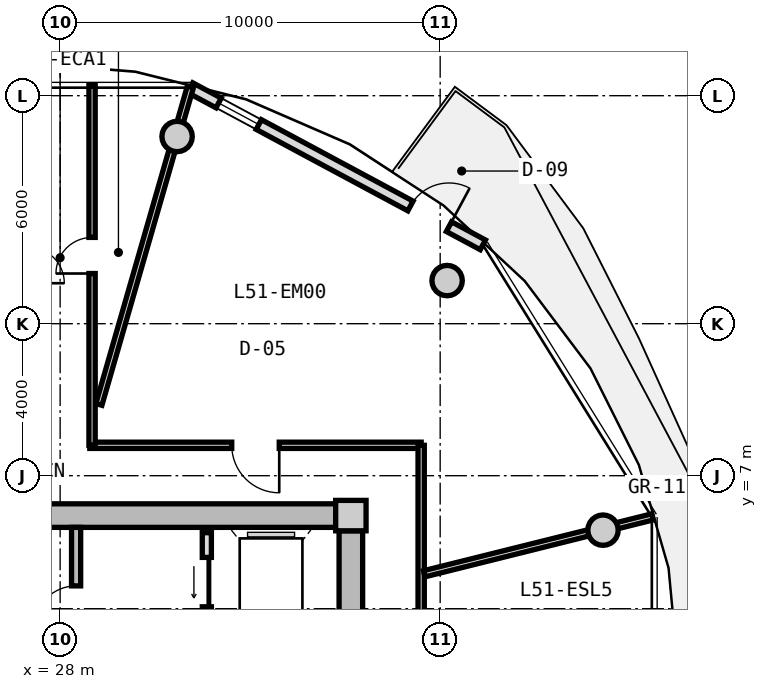
"""IFC4 building model, lengths in metres.
Left out: names, types, materials, properties, quantities, classifications, styles, units other than length and angle.
Written with IfcOpenShell. Run it as: python <this file> out.ifc"""

import sys

from ifc_helpers import new_model, si_unit, direction, frame, frame_2d, origin, origin_2d, place, context, subcontext, project, spatial, rectangle, circle, extrude, source, transform, mapped, element, fill, save


model = new_model("IFC4")
c1 = context("Model", 3, precision=1e-05, world=origin(), true_north=direction((0.0, 1.0)))
c2 = subcontext(c1, "Body", "Model", "MODEL_VIEW")
j1 = project(units=[si_unit("LENGTHUNIT", "METRE"), si_unit("PLANEANGLEUNIT", "RADIAN")], contexts=[c1])
p1 = place(None, origin())
s1 = spatial("IfcSite", under=j1, at=p1, CompositionType="ELEMENT")
p2 = place(p1, origin())
s2 = spatial("IfcBuilding", under=s1, at=p2, CompositionType="ELEMENT")
p3 = place(p2, frame((0.0, 0.0, 164.8)))
s3 = spatial("IfcBuildingStorey", under=s2, at=p3, CompositionType="ELEMENT", Elevation=164.8)
m1 = source(origin(), c2, "Body", "SweptSolid", [
    extrude(rectangle(XDim=0.8, YDim=0.8, at=origin_2d()), origin(), (0.0, 0.0, 1.0), 3.05),
])
p4 = place(p3, frame((35.65, 5.95, 0.0), z_axis=(0.0, 0.0, 1.0), x_axis=(1.0, 0.0, 0.0)))
e1 = element("IfcColumn", 1, at=p4, inside=s3, PredefinedType="COLUMN", context=c2, shape_type="MappedRepresentation", body=[
    mapped(m1, transform((0.0, 0.0, 0.0), x_axis=(1.0, 0.0, 0.0), y_axis=(0.0, 1.0, 0.0), z_axis=(0.0, 0.0, 1.0), scale=1.0)),
])
m2 = source(origin(), c2, "Body", "SweptSolid", [
    extrude(rectangle(XDim=14.5, YDim=0.62, at=frame_2d((7.25, 0.0))), origin(), (0.0, 0.0, 1.0), 2.81),
])
p5 = place(p3, frame((20.75, 5.95, 0.0), z_axis=(0.0, 0.0, 1.0), x_axis=(1.0, 0.0, 0.0)))
e2 = element("IfcWall", 2, at=p5, inside=s3, PredefinedType="SHEAR", context=c2, shape_type="MappedRepresentation", body=[
    mapped(m2, transform((0.0, 0.0, 0.0), x_axis=(1.0, 0.0, 0.0), y_axis=(0.0, 1.0, 0.0), z_axis=(0.0, 0.0, 1.0), scale=1.0)),
])
m3 = source(origin(), c2, "Body", "SweptSolid", [
    extrude(rectangle(XDim=11.1, YDim=0.62, at=frame_2d((5.55, 0.0))), origin(), (0.0, 0.0, 1.0), 2.81),
])
p6 = place(p3, frame((35.65, 5.55, 0.0), z_axis=(0.0, 0.0, 1.0), x_axis=(0.0, -1.0, 0.0)))
e3 = element("IfcWall", 3, at=p6, inside=s3, PredefinedType="SHEAR", context=c2, shape_type="MappedRepresentation", body=[
    mapped(m3, transform((0.0, 0.0, 0.0), x_axis=(1.0, 0.0, 0.0), y_axis=(0.0, 1.0, 0.0), z_axis=(0.0, 0.0, 1.0), scale=1.0)),
])
p7 = place(p6, frame((5.65, 0.0, 0.0)))
e4 = element("IfcOpeningElement", 4, at=p7, cuts=e3, PredefinedType="OPENING", context=c2, shape_type="SweptSolid", body=[
    extrude(rectangle(XDim=1.2, YDim=2.15, at=frame_2d((0.6, 1.075))), frame((0.0, 0.32, 0.0), z_axis=(0.0, -1.0, 0.0), x_axis=(1.0, 0.0, 0.0)), (0.0, 0.0, 1.0), 0.64),
])
m4 = source(origin(), c2, "Body", "SweptSolid", [
    extrude(circle(Radius=0.4, at=origin_2d()), origin(), (0.0, 0.0, 1.0), 3.05),
])
for number, where, z_axis, x_axis in (
    (5, (42.285, 5.567, 0.0), (0.0, 0.0, 1.0), (1.0, 0.0, 0.0)),
    (6, (38.183, 12.135, 0.0), (0.0, 0.0, 1.0), (1.0, 0.0, 0.0)),
    (7, (31.077, 15.926, 0.0), (0.0, 0.0, 1.0), (1.0, 0.0, 0.0)),
):
    element("IfcColumn", number, at=place(p3, frame(where, z_axis=z_axis, x_axis=x_axis)), inside=s3, PredefinedType="COLUMN", context=c2, shape_type="MappedRepresentation", body=[
        mapped(m4, transform((0.0, 0.0, 0.0), x_axis=(1.0, 0.0, 0.0), y_axis=(0.0, 1.0, 0.0), z_axis=(0.0, 0.0, 1.0), scale=1.0)),
    ])
m5 = source(origin(), c2, "Body", "SweptSolid", [
    extrude(rectangle(XDim=8.742, YDim=0.29, at=frame_2d((4.371, 0.0))), origin(), (0.0, 0.0, 1.0), 2.81),
])
p8 = place(p3, frame((31.422, 17.211, 0.0), z_axis=(0.0, 0.0, 1.0), x_axis=(0.880992489116, -0.473130250693, 0.0)))
e8 = element("IfcWall", 8, at=p8, inside=s3, PredefinedType="SOLIDWALL", context=c2, shape_type="MappedRepresentation", body=[
    mapped(m5, transform((0.0, 0.0, 0.0), x_axis=(1.0, 0.0, 0.0), y_axis=(0.0, 1.0, 0.0), z_axis=(0.0, 0.0, 1.0), scale=1.0)),
])
p9 = place(p8, frame((6.58, 0.0, 0.0)))
e9 = element("IfcOpeningElement", 9, at=p9, cuts=e8, PredefinedType="OPENING", context=c2, shape_type="SweptSolid", body=[
    extrude(rectangle(XDim=1.15, YDim=2.25, at=frame_2d((0.575, 1.125))), frame((0.0, 0.155, 0.0), z_axis=(0.0, -1.0, 0.0), x_axis=(1.0, 0.0, 0.0)), (0.0, 0.0, 1.0), 0.31),
])
p10 = place(p8, frame((0.85, 0.0, 0.85)))
e10 = element("IfcOpeningElement", 10, at=p10, cuts=e8, PredefinedType="OPENING", context=c2, shape_type="SweptSolid", body=[
    extrude(rectangle(XDim=1.2, YDim=1.5, at=frame_2d((0.6, 0.75))), frame((0.0, 0.155, 0.0), z_axis=(0.0, -1.0, 0.0), x_axis=(1.0, 0.0, 0.0)), (0.0, 0.0, 1.0), 0.31),
])
m6 = source(origin(), c2, "Body", "SweptSolid", [
    extrude(rectangle(XDim=3.19, YDim=0.24, at=frame_2d((1.595, 0.0))), origin(), (0.0, 0.0, 1.0), 2.81),
])
p11 = place(p3, frame((28.42, 2.45, 0.0), z_axis=(0.0, 0.0, 1.0), x_axis=(0.0, 1.0, 0.0)))
e11 = element("IfcWall", 11, at=p11, inside=s3, PredefinedType="PARTITIONING", context=c2, shape_type="MappedRepresentation", body=[
    mapped(m6, transform((0.0, 0.0, 0.0), x_axis=(1.0, 0.0, 0.0), y_axis=(0.0, 1.0, 0.0), z_axis=(0.0, 0.0, 1.0), scale=1.0)),
])
p12 = place(p11, frame((0.55, 0.0, 0.0)))
e12 = element("IfcOpeningElement", 12, at=p12, cuts=e11, PredefinedType="OPENING", context=c2, shape_type="SweptSolid", body=[
    extrude(rectangle(XDim=1.1, YDim=2.15, at=frame_2d((0.55, 1.075))), frame((0.0, 0.13, 0.0), z_axis=(0.0, -1.0, 0.0), x_axis=(1.0, 0.0, 0.0)), (0.0, 0.0, 1.0), 0.26),
])
m7 = source(origin(), c2, "Body", "SweptSolid", [
    extrude(rectangle(XDim=5.0, YDim=0.24, at=frame_2d((2.5, 0.0))), origin(), (0.0, 0.0, 1.0), 2.795),
])
p13 = place(p3, frame((31.86, 0.5, 0.0), z_axis=(0.0, 0.0, 1.0), x_axis=(0.0, 1.0, 0.0)))
e13 = element("IfcWall", 13, at=p13, inside=s3, PredefinedType="PARTITIONING", context=c2, shape_type="MappedRepresentation", body=[
    mapped(m7, transform((0.0, 0.0, 0.0), x_axis=(1.0, 0.0, 0.0), y_axis=(0.0, 1.0, 0.0), z_axis=(0.0, 0.0, 1.0), scale=1.0)),
])
p14 = place(p13, frame((3.05, 0.0, 0.0)))
e14 = element("IfcOpeningElement", 14, at=p14, cuts=e13, PredefinedType="OPENING", context=c2, shape_type="SweptSolid", body=[
    extrude(rectangle(XDim=1.3, YDim=2.2, at=frame_2d((0.65, 1.1))), frame((0.0, 0.13, 0.0), z_axis=(0.0, -1.0, 0.0), x_axis=(1.0, 0.0, 0.0)), (0.0, 0.0, 1.0), 0.26),
])
p15 = place(p13, frame((0.55, 0.0, 0.0)))
e15 = element("IfcOpeningElement", 15, at=p15, cuts=e13, PredefinedType="OPENING", context=c2, shape_type="SweptSolid", body=[
    extrude(rectangle(XDim=1.3, YDim=2.2, at=frame_2d((0.65, 1.1))), frame((0.0, 0.13, 0.0), z_axis=(0.0, -1.0, 0.0), x_axis=(1.0, 0.0, 0.0)), (0.0, 0.0, 1.0), 0.26),
])
m8 = source(origin(), c2, "Body", "SweptSolid", [
    extrude(rectangle(XDim=8.719, YDim=0.165, at=frame_2d((4.36, 0.0))), origin(), (0.0, 0.0, 1.0), 2.795),
])
p16 = place(p3, frame((28.781, 7.8, 0.0), z_axis=(0.0, 0.0, 1.0), x_axis=(1.0, 0.0, 0.0)))
e16 = element("IfcWall", 16, at=p16, inside=s3, PredefinedType="PARTITIONING", context=c2, shape_type="MappedRepresentation", body=[
    mapped(m8, transform((0.0, 0.0, 0.0), x_axis=(1.0, 0.0, 0.0), y_axis=(0.0, 1.0, 0.0), z_axis=(0.0, 0.0, 1.0), scale=1.0)),
])
p17 = place(p16, frame((3.735, 0.0, 0.0)))
e17 = element("IfcOpeningElement", 17, at=p17, cuts=e16, PredefinedType="OPENING", context=c2, shape_type="SweptSolid", body=[
    extrude(rectangle(XDim=1.25, YDim=2.2, at=frame_2d((0.625, 1.1))), frame((0.0, 0.093, 0.0), z_axis=(0.0, -1.0, 0.0), x_axis=(1.0, 0.0, 0.0)), (0.0, 0.0, 1.0), 0.185),
])
m9 = source(origin(), c2, "Body", "SweptSolid", [
    extrude(rectangle(XDim=6.88, YDim=0.165, at=frame_2d((3.44, 0.0))), origin(), (0.0, 0.0, 1.0), 2.795),
])
p18 = place(p3, frame((37.5, 7.8, 0.0), z_axis=(0.0, 0.0, 1.0), x_axis=(0.0, -1.0, 0.0)))
e18 = element("IfcWall", 18, at=p18, inside=s3, PredefinedType="PARTITIONING", context=c2, shape_type="MappedRepresentation", body=[
    mapped(m9, transform((0.0, 0.0, 0.0), x_axis=(1.0, 0.0, 0.0), y_axis=(0.0, 1.0, 0.0), z_axis=(0.0, 0.0, 1.0), scale=1.0)),
])
m10 = source(origin(), c2, "Body", "SweptSolid", [
    extrude(rectangle(XDim=8.695, YDim=0.165, at=frame_2d((4.348, 0.0))), origin(), (0.0, 0.0, 1.0), 2.345),
])
p19 = place(p3, frame((29.02, 8.875, 0.0), z_axis=(0.0, 0.0, 1.0), x_axis=(0.276797231892, 0.960928349263, 0.0)))
e19 = element("IfcWall", 19, at=p19, inside=s3, PredefinedType="PARTITIONING", context=c2, shape_type="MappedRepresentation", body=[
    mapped(m10, transform((0.0, 0.0, 0.0), x_axis=(1.0, 0.0, 0.0), y_axis=(0.0, 1.0, 0.0), z_axis=(0.0, 0.0, 1.0), scale=1.0)),
])
m11 = source(origin(), c2, "Body", "SweptSolid", [
    extrude(rectangle(XDim=6.193, YDim=0.165, at=frame_2d((3.096, 0.0))), origin(), (0.0, 0.0, 1.0), 2.345),
])
p20 = place(p3, frame((37.58, 4.419, 0.0), z_axis=(0.0, 0.0, 1.0), x_axis=(0.970309243466, 0.241867674657, 0.0)))
e20 = element("IfcWall", 20, at=p20, inside=s3, PredefinedType="PARTITIONING", context=c2, shape_type="MappedRepresentation", body=[
    mapped(m11, transform((0.0, 0.0, 0.0), x_axis=(1.0, 0.0, 0.0), y_axis=(0.0, 1.0, 0.0), z_axis=(0.0, 0.0, 1.0), scale=1.0)),
])
m12 = source(origin(), c2, "Body", "SweptSolid", [
    extrude(rectangle(XDim=9.48, YDim=0.165, at=frame_2d((4.74, 0.0))), origin(), (0.0, 0.0, 1.0), 2.795),
])
p21 = place(p3, frame((28.84, 17.28, 0.0), z_axis=(0.0, 0.0, 1.0), x_axis=(0.0, -1.0, 0.0)))
e21 = element("IfcWall", 21, at=p21, inside=s3, PredefinedType="PARTITIONING", context=c2, shape_type="MappedRepresentation", body=[
    mapped(m12, transform((0.0, 0.0, 0.0), x_axis=(1.0, 0.0, 0.0), y_axis=(0.0, 1.0, 0.0), z_axis=(0.0, 0.0, 1.0), scale=1.0)),
])
p22 = place(p21, frame((4.01, 0.0, 0.0)))
e22 = element("IfcOpeningElement", 22, at=p22, cuts=e21, PredefinedType="OPENING", context=c2, shape_type="SweptSolid", body=[
    extrude(rectangle(XDim=0.95, YDim=2.1, at=frame_2d((0.475, 1.05))), frame((0.0, 0.093, 0.0), z_axis=(0.0, -1.0, 0.0), x_axis=(1.0, 0.0, 0.0)), (0.0, 0.0, 1.0), 0.185),
])
m13 = source(origin(), c2, "Body", "SweptSolid", [
    extrude(rectangle(XDim=1.15, YDim=2.25, at=frame_2d((0.575, 1.125))), frame((0.0, 0.025, 0.0), z_axis=(0.0, -1.0, 0.0), x_axis=(1.0, 0.0, 0.0)), (0.0, 0.0, 1.0), 0.05),
])
p23 = place(p9, origin())
e23 = element("IfcDoor", 23, at=p23, inside=s3, OperationType="SINGLE_SWING_RIGHT", PredefinedType="DOOR", context=c2, shape_type="MappedRepresentation", body=[
    mapped(m13, transform((0.0, 0.0, 0.0), x_axis=(1.0, 0.0, 0.0), y_axis=(0.0, 1.0, 0.0), z_axis=(0.0, 0.0, 1.0), scale=1.0)),
])
fill(e9, e23)
m14 = source(origin(), c2, "Body", "SweptSolid", [
    extrude(rectangle(XDim=1.2, YDim=1.5, at=frame_2d((0.6, 0.75))), frame((0.0, 0.03, 0.0), z_axis=(0.0, -1.0, 0.0), x_axis=(1.0, 0.0, 0.0)), (0.0, 0.0, 1.0), 0.06),
])
p24 = place(p10, origin())
e24 = element("IfcWindow", 24, at=p24, inside=s3, PartitioningType="SINGLE_PANEL", PredefinedType="WINDOW", context=c2, shape_type="MappedRepresentation", body=[
    mapped(m14, transform((0.0, 0.0, 0.0), x_axis=(1.0, 0.0, 0.0), y_axis=(0.0, 1.0, 0.0), z_axis=(0.0, 0.0, 1.0), scale=1.0)),
])
fill(e10, e24)
m15 = source(origin(), c2, "Body", "SweptSolid", [
    extrude(rectangle(XDim=1.1, YDim=2.15, at=frame_2d((0.55, 1.075))), frame((0.0, 0.025, 0.0), z_axis=(0.0, -1.0, 0.0), x_axis=(1.0, 0.0, 0.0)), (0.0, 0.0, 1.0), 0.05),
])
p25 = place(p12, origin())
e25 = element("IfcDoor", 25, at=p25, inside=s3, OperationType="SINGLE_SWING_LEFT", PredefinedType="DOOR", context=c2, shape_type="MappedRepresentation", body=[
    mapped(m15, transform((0.0, 0.0, 0.0), x_axis=(1.0, 0.0, 0.0), y_axis=(0.0, 1.0, 0.0), z_axis=(0.0, 0.0, 1.0), scale=1.0)),
])
fill(e12, e25)
m16 = source(origin(), c2, "Body", "SweptSolid", [
    extrude(rectangle(XDim=1.3, YDim=2.2, at=frame_2d((0.65, 1.1))), frame((0.0, 0.025, 0.0), z_axis=(0.0, -1.0, 0.0), x_axis=(1.0, 0.0, 0.0)), (0.0, 0.0, 1.0), 0.05),
])
p26 = place(p14, origin())
e26 = element("IfcDoor", 26, at=p26, inside=s3, OperationType="SLIDING_TO_LEFT", PredefinedType="DOOR", context=c2, shape_type="MappedRepresentation", body=[
    mapped(m16, transform((0.0, 0.0, 0.0), x_axis=(1.0, 0.0, 0.0), y_axis=(0.0, 1.0, 0.0), z_axis=(0.0, 0.0, 1.0), scale=1.0)),
])
fill(e14, e26)
m17 = source(origin(), c2, "Body", "SweptSolid", [
    extrude(rectangle(XDim=0.95, YDim=2.1, at=frame_2d((0.475, 1.05))), frame((0.0, 0.025, 0.0), z_axis=(0.0, -1.0, 0.0), x_axis=(1.0, 0.0, 0.0)), (0.0, 0.0, 1.0), 0.05),
])
p27 = place(p22, frame((0.95, 0.0, 0.0), z_axis=(0.0, 0.0, 1.0), x_axis=(-1.0, 0.0, 0.0)))
e27 = element("IfcDoor", 27, at=p27, inside=s3, OperationType="SINGLE_SWING_LEFT", PredefinedType="DOOR", context=c2, shape_type="MappedRepresentation", body=[
    mapped(m17, transform((0.0, 0.0, 0.0), x_axis=(1.0, 0.0, 0.0), y_axis=(0.0, 1.0, 0.0), z_axis=(0.0, 0.0, 1.0), scale=1.0)),
])
fill(e22, e27)
m18 = source(origin(), c2, "Body", "SweptSolid", [
    extrude(rectangle(XDim=1.25, YDim=2.2, at=frame_2d((0.625, 1.1))), frame((0.0, 0.025, 0.0), z_axis=(0.0, -1.0, 0.0), x_axis=(1.0, 0.0, 0.0)), (0.0, 0.0, 1.0), 0.05),
])
p28 = place(p17, frame((1.25, 0.0, 0.0), z_axis=(0.0, 0.0, 1.0), x_axis=(-1.0, 0.0, 0.0)))
e28 = element("IfcDoor", 28, at=p28, inside=s3, OperationType="SINGLE_SWING_LEFT", PredefinedType="DOOR", context=c2, shape_type="MappedRepresentation", body=[
    mapped(m18, transform((0.0, 0.0, 0.0), x_axis=(1.0, 0.0, 0.0), y_axis=(0.0, 1.0, 0.0), z_axis=(0.0, 0.0, 1.0), scale=1.0)),
])
fill(e17, e28)
save(model, sys.argv[1])
